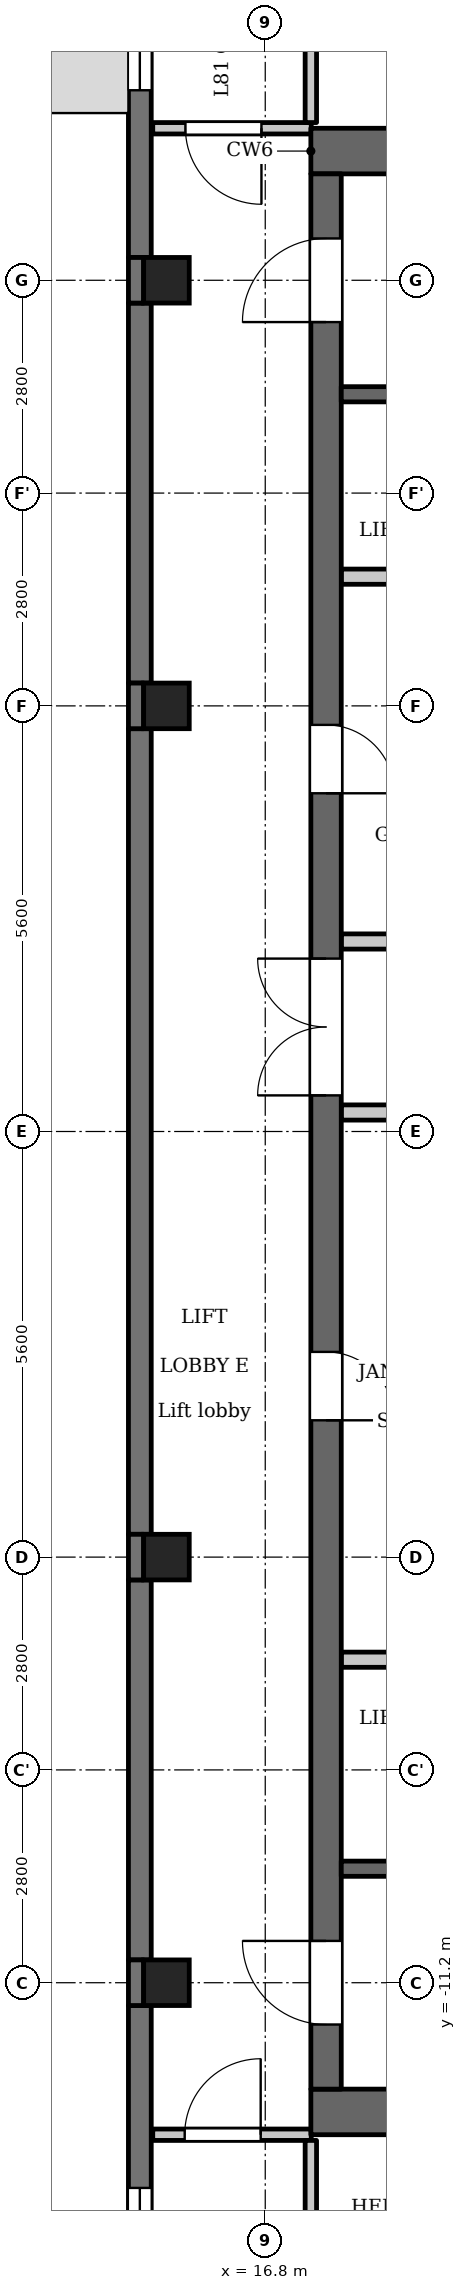
"""IFC4 building model, lengths in metres.
Left out: names, types, materials, properties, quantities, classifications, styles, units other than length and angle.
Written with IfcOpenShell. Run it as: python <this file> out.ifc"""

import sys

from ifc_helpers import new_model, si_unit, direction, frame, frame_2d, origin, origin_2d, place, context, subcontext, project, spatial, polyline, rectangle, outline, extrude, element, fill, save


model = new_model("IFC4")
c1 = context("Model", 3, precision=1e-05, world=origin(), true_north=direction((0.0, 1.0)))
c2 = subcontext(c1, "Body", "Model", "MODEL_VIEW")
j1 = project(units=[si_unit("LENGTHUNIT", "METRE"), si_unit("PLANEANGLEUNIT", "RADIAN")], contexts=[c1])
p1 = place(None, origin())
s1 = spatial("IfcSite", under=j1, at=p1, CompositionType="ELEMENT")
p2 = place(p1, origin())
s2 = spatial("IfcBuilding", under=s1, at=p2, CompositionType="ELEMENT")
p3 = place(p2, frame((0.0, 0.0, 313.9)))
s3 = spatial("IfcBuildingStorey", under=s2, at=p3, CompositionType="ELEMENT", Elevation=313.9)
for number, where, z_axis, x_axis in (
    (1, (15.5, -11.2, 0.0), (0.0, 0.0, 1.0), (1.0, 0.0, 0.0)),
    (2, (15.5, -5.6, 0.0), (0.0, 0.0, 1.0), (1.0, 0.0, 0.0)),
    (3, (15.5, 5.6, 0.0), (0.0, 0.0, 1.0), (1.0, 0.0, 0.0)),
    (4, (15.5, 11.2, 0.0), (0.0, 0.0, 1.0), (1.0, 0.0, 0.0)),
):
    element("IfcColumn", number, at=place(p3, frame(where, z_axis=z_axis, x_axis=x_axis)), inside=s3, PredefinedType="COLUMN", context=c2, shape_type="SweptSolid", body=[
        extrude(rectangle(XDim=0.6, YDim=0.6, at=origin_2d()), origin(), (0.0, 0.0, 1.0), 3.5),
    ])
p4 = place(p3, frame((15.15, 18.8, 0.0), z_axis=(0.0, 0.0, 1.0), x_axis=(0.0, -1.0, 0.0)))
e5 = element("IfcWall", 5, at=p4, inside=s3, PredefinedType="SOLIDWALL", context=c2, shape_type="SweptSolid", body=[
    extrude(rectangle(XDim=7.3, YDim=0.3, at=frame_2d((3.65, 0.0))), origin(), (0.0, 0.0, 1.0), 3.2),
])
p5 = place(p4, frame((0.462, 0.0, 0.9)))
e6 = element("IfcOpeningElement", 6, at=p5, cuts=e5, PredefinedType="OPENING", context=c2, shape_type="SweptSolid", body=[
    extrude(rectangle(XDim=1.8, YDim=1.25, at=frame_2d((0.9, 0.625))), frame((0.0, 0.16, 0.0), z_axis=(0.0, -1.0, 0.0), x_axis=(1.0, 0.0, 0.0)), (0.0, 0.0, 1.0), 0.32),
])
p6 = place(p4, frame((3.3, 0.0, 0.9)))
e7 = element("IfcOpeningElement", 7, at=p6, cuts=e5, PredefinedType="OPENING", context=c2, shape_type="SweptSolid", body=[
    extrude(rectangle(XDim=1.8, YDim=1.25, at=frame_2d((0.9, 0.625))), frame((0.0, 0.16, 0.0), z_axis=(0.0, -1.0, 0.0), x_axis=(1.0, 0.0, 0.0)), (0.0, 0.0, 1.0), 0.32),
])
p7 = place(p3, frame((15.15, 10.9, 0.0), z_axis=(0.0, 0.0, 1.0), x_axis=(0.0, -1.0, 0.0)))
e8 = element("IfcWall", 8, at=p7, inside=s3, PredefinedType="SOLIDWALL", context=c2, shape_type="SweptSolid", body=[
    extrude(rectangle(XDim=5.0, YDim=0.3, at=frame_2d((2.5, 0.0))), origin(), (0.0, 0.0, 1.0), 3.2),
])
p8 = place(p3, frame((15.15, 5.3, 0.0), z_axis=(0.0, 0.0, 1.0), x_axis=(0.0, -1.0, 0.0)))
e9 = element("IfcWall", 9, at=p8, inside=s3, PredefinedType="SOLIDWALL", context=c2, shape_type="SweptSolid", body=[
    extrude(rectangle(XDim=10.6, YDim=0.3, at=frame_2d((5.3, 0.0))), origin(), (0.0, 0.0, 1.0), 3.2),
])
p9 = place(p3, frame((15.15, -5.9, 0.0), z_axis=(0.0, 0.0, 1.0), x_axis=(0.0, -1.0, 0.0)))
e10 = element("IfcWall", 10, at=p9, inside=s3, PredefinedType="SOLIDWALL", context=c2, shape_type="SweptSolid", body=[
    extrude(rectangle(XDim=5.0, YDim=0.3, at=frame_2d((2.5, 0.0))), origin(), (0.0, 0.0, 1.0), 3.2),
])
p10 = place(p3, frame((15.15, -11.5, 0.0), z_axis=(0.0, 0.0, 1.0), x_axis=(0.0, -1.0, 0.0)))
e11 = element("IfcWall", 11, at=p10, inside=s3, PredefinedType="SOLIDWALL", context=c2, shape_type="SweptSolid", body=[
    extrude(rectangle(XDim=7.3, YDim=0.3, at=frame_2d((3.65, 0.0))), origin(), (0.0, 0.0, 1.0), 3.2),
])
p11 = place(p10, frame((2.4, 0.0, 0.9)))
e12 = element("IfcOpeningElement", 12, at=p11, cuts=e11, PredefinedType="OPENING", context=c2, shape_type="SweptSolid", body=[
    extrude(rectangle(XDim=2.6, YDim=1.25, at=frame_2d((1.3, 0.625))), frame((0.0, 0.16, 0.0), z_axis=(0.0, -1.0, 0.0), x_axis=(1.0, 0.0, 0.0)), (0.0, 0.0, 1.0), 0.32),
])
p12 = place(p10, frame((6.137, 0.0, 0.6)))
e13 = element("IfcOpeningElement", 13, at=p12, cuts=e11, PredefinedType="OPENING", context=c2, shape_type="SweptSolid", body=[
    extrude(rectangle(XDim=0.8, YDim=1.55, at=frame_2d((0.4, 0.775))), frame((0.0, 0.16, 0.0), z_axis=(0.0, -1.0, 0.0), x_axis=(1.0, 0.0, 0.0)), (0.0, 0.0, 1.0), 0.32),
])
p13 = place(p3, frame((0.0, 0.0, 3.5)))
e14 = element("IfcWall", 14, at=p13, inside=s3, PredefinedType="PARAPET", context=c2, shape_type="SweptSolid", body=[
    extrude(outline(polyline([(15.0, 19.6), (15.0, -19.6), (17.2, -19.6), (19.424, -19.176), (21.297, -17.903), (23.503, -15.697), (24.776, -13.824), (25.2, -11.6), (25.2, 11.6), (24.776, 13.824), (23.503, 15.697), (21.297, 17.903), (19.424, 19.176), (17.2, 19.6), (15.0, 19.6)]), holes=[polyline([(17.172, -19.3), (15.3, -19.3), (15.3, 19.3), (17.172, 19.3), (19.307, 18.893), (21.105, 17.671), (23.271, 15.505), (24.493, 13.707), (24.9, 11.572), (24.9, -11.572), (24.493, -13.707), (23.271, -15.505), (21.105, -17.671), (19.307, -18.893), (17.172, -19.3)])]), origin(), (0.0, 0.0, 1.0), 1.5),
])
for number, where, z_axis, x_axis in (
    (15, (17.4, 12.9, 0.0), (0.0, 0.0, 1.0), (1.0, 0.0, 0.0)),
    (16, (17.4, -12.9, 0.0), (0.0, 0.0, 1.0), (1.0, 0.0, 0.0)),
):
    element("IfcWall", number, at=place(p3, frame(where, z_axis=z_axis, x_axis=x_axis)), inside=s3, PredefinedType="SHEAR", context=c2, shape_type="SweptSolid", body=[
        extrude(rectangle(XDim=7.6, YDim=0.6, at=frame_2d((3.8, 0.0))), origin(), (0.0, 0.0, 1.0), 3.2),
    ])
p14 = place(p3, frame((17.6, -12.6, 0.0), z_axis=(0.0, 0.0, 1.0), x_axis=(0.0, 1.0, 0.0)))
e17 = element("IfcWall", 17, at=p14, inside=s3, PredefinedType="SHEAR", context=c2, shape_type="SweptSolid", body=[
    extrude(rectangle(XDim=25.2, YDim=0.4, at=frame_2d((12.6, 0.0))), origin(), (0.0, 0.0, 1.0), 3.2),
])
p15 = place(p14, frame((8.8, 0.0, 0.0)))
e18 = element("IfcOpeningElement", 18, at=p15, cuts=e17, PredefinedType="OPENING", context=c2, shape_type="SweptSolid", body=[
    extrude(rectangle(XDim=0.9, YDim=2.1, at=frame_2d((0.45, 1.05))), frame((0.0, 0.21, 0.0), z_axis=(0.0, -1.0, 0.0), x_axis=(1.0, 0.0, 0.0)), (0.0, 0.0, 1.0), 0.42),
])
p16 = place(p14, frame((17.05, 0.0, 0.0)))
e19 = element("IfcOpeningElement", 19, at=p16, cuts=e17, PredefinedType="OPENING", context=c2, shape_type="SweptSolid", body=[
    extrude(rectangle(XDim=0.9, YDim=2.1, at=frame_2d((0.45, 1.05))), frame((0.0, 0.21, 0.0), z_axis=(0.0, -1.0, 0.0), x_axis=(1.0, 0.0, 0.0)), (0.0, 0.0, 1.0), 0.42),
])
p17 = place(p14, frame((23.25, 0.0, 0.0)))
e20 = element("IfcOpeningElement", 20, at=p17, cuts=e17, PredefinedType="OPENING", context=c2, shape_type="SweptSolid", body=[
    extrude(rectangle(XDim=1.1, YDim=2.1, at=frame_2d((0.55, 1.05))), frame((0.0, 0.21, 0.0), z_axis=(0.0, -1.0, 0.0), x_axis=(1.0, 0.0, 0.0)), (0.0, 0.0, 1.0), 0.42),
])
p18 = place(p14, frame((0.85, 0.0, 0.0)))
e21 = element("IfcOpeningElement", 21, at=p18, cuts=e17, PredefinedType="OPENING", context=c2, shape_type="SweptSolid", body=[
    extrude(rectangle(XDim=1.1, YDim=2.1, at=frame_2d((0.55, 1.05))), frame((0.0, 0.21, 0.0), z_axis=(0.0, -1.0, 0.0), x_axis=(1.0, 0.0, 0.0)), (0.0, 0.0, 1.0), 0.42),
])
p19 = place(p14, frame((13.075, 0.0, 0.0)))
e22 = element("IfcOpeningElement", 22, at=p19, cuts=e17, PredefinedType="OPENING", context=c2, shape_type="SweptSolid", body=[
    extrude(rectangle(XDim=1.8, YDim=2.1, at=frame_2d((0.9, 1.05))), frame((0.0, 0.21, 0.0), z_axis=(0.0, -1.0, 0.0), x_axis=(1.0, 0.0, 0.0)), (0.0, 0.0, 1.0), 0.42),
])
p20 = place(p3, frame((17.8, -9.7, 0.0), z_axis=(0.0, 0.0, 1.0), x_axis=(1.0, 0.0, 0.0)))
e23 = element("IfcWall", 23, at=p20, inside=s3, PredefinedType="SHEAR", context=c2, shape_type="SweptSolid", body=[
    extrude(rectangle(XDim=5.8, YDim=0.2, at=frame_2d((2.9, 0.0))), origin(), (0.0, 0.0, 1.0), 3.2),
])
p21 = place(p20, frame((0.85, 0.0, 0.0)))
e24 = element("IfcOpeningElement", 24, at=p21, cuts=e23, PredefinedType="OPENING", context=c2, shape_type="SweptSolid", body=[
    extrude(rectangle(XDim=1.1, YDim=2.1, at=frame_2d((0.55, 1.05))), frame((0.0, 0.11, 0.0), z_axis=(0.0, -1.0, 0.0), x_axis=(1.0, 0.0, 0.0)), (0.0, 0.0, 1.0), 0.22),
])
p22 = place(p20, frame((3.75, 0.0, 0.0)))
e25 = element("IfcOpeningElement", 25, at=p22, cuts=e23, PredefinedType="OPENING", context=c2, shape_type="SweptSolid", body=[
    extrude(rectangle(XDim=1.1, YDim=2.1, at=frame_2d((0.55, 1.05))), frame((0.0, 0.11, 0.0), z_axis=(0.0, -1.0, 0.0), x_axis=(1.0, 0.0, 0.0)), (0.0, 0.0, 1.0), 0.22),
])
p23 = place(p3, frame((17.8, -6.95, 0.0), z_axis=(0.0, 0.0, 1.0), x_axis=(1.0, 0.0, 0.0)))
e26 = element("IfcWall", 26, at=p23, inside=s3, PredefinedType="PARTITIONING", context=c2, shape_type="SweptSolid", body=[
    extrude(rectangle(XDim=2.8, YDim=0.2, at=frame_2d((1.4, 0.0))), origin(), (0.0, 0.0, 1.0), 3.2),
])
p24 = place(p3, frame((17.8, 0.25, 0.0), z_axis=(0.0, 0.0, 1.0), x_axis=(1.0, 0.0, 0.0)))
e27 = element("IfcWall", 27, at=p24, inside=s3, PredefinedType="PARTITIONING", context=c2, shape_type="SweptSolid", body=[
    extrude(rectangle(XDim=3.0, YDim=0.2, at=frame_2d((1.5, 0.0))), origin(), (0.0, 0.0, 1.0), 3.2),
])
p25 = place(p24, frame((1.98, 0.0, 0.0)))
e28 = element("IfcOpeningElement", 28, at=p25, cuts=e27, PredefinedType="OPENING", context=c2, shape_type="SweptSolid", body=[
    extrude(rectangle(XDim=0.9, YDim=2.1, at=frame_2d((0.45, 1.05))), frame((0.0, 0.11, 0.0), z_axis=(0.0, -1.0, 0.0), x_axis=(1.0, 0.0, 0.0)), (0.0, 0.0, 1.0), 0.22),
])
p26 = place(p3, frame((17.8, 2.5, 0.0), z_axis=(0.0, 0.0, 1.0), x_axis=(1.0, 0.0, 0.0)))
e29 = element("IfcWall", 29, at=p26, inside=s3, PredefinedType="PARTITIONING", context=c2, shape_type="SweptSolid", body=[
    extrude(rectangle(XDim=3.0, YDim=0.2, at=frame_2d((1.5, 0.0))), origin(), (0.0, 0.0, 1.0), 3.2),
])
p27 = place(p3, frame((17.8, 7.3, 0.0), z_axis=(0.0, 0.0, 1.0), x_axis=(1.0, 0.0, 0.0)))
e30 = element("IfcWall", 30, at=p27, inside=s3, PredefinedType="PARTITIONING", context=c2, shape_type="SweptSolid", body=[
    extrude(rectangle(XDim=2.8, YDim=0.2, at=frame_2d((1.4, 0.0))), origin(), (0.0, 0.0, 1.0), 3.2),
])
p28 = place(p3, frame((17.8, 9.7, 0.0), z_axis=(0.0, 0.0, 1.0), x_axis=(1.0, 0.0, 0.0)))
e31 = element("IfcWall", 31, at=p28, inside=s3, PredefinedType="SHEAR", context=c2, shape_type="SweptSolid", body=[
    extrude(rectangle(XDim=5.8, YDim=0.2, at=frame_2d((2.9, 0.0))), origin(), (0.0, 0.0, 1.0), 3.2),
])
p29 = place(p28, frame((0.85, 0.0, 0.0)))
e32 = element("IfcOpeningElement", 32, at=p29, cuts=e31, PredefinedType="OPENING", context=c2, shape_type="SweptSolid", body=[
    extrude(rectangle(XDim=1.1, YDim=2.1, at=frame_2d((0.55, 1.05))), frame((0.0, 0.11, 0.0), z_axis=(0.0, -1.0, 0.0), x_axis=(1.0, 0.0, 0.0)), (0.0, 0.0, 1.0), 0.22),
])
p30 = place(p28, frame((3.75, 0.0, 0.0)))
e33 = element("IfcOpeningElement", 33, at=p30, cuts=e31, PredefinedType="OPENING", context=c2, shape_type="SweptSolid", body=[
    extrude(rectangle(XDim=1.1, YDim=2.1, at=frame_2d((0.55, 1.05))), frame((0.0, 0.11, 0.0), z_axis=(0.0, -1.0, 0.0), x_axis=(1.0, 0.0, 0.0)), (0.0, 0.0, 1.0), 0.22),
])
p31 = place(p3, frame((15.32, -13.2, 0.0), z_axis=(0.0, 0.0, 1.0), x_axis=(1.0, 0.0, 0.0)))
e34 = element("IfcWall", 34, at=p31, inside=s3, PredefinedType="PARTITIONING", context=c2, shape_type="SweptSolid", body=[
    extrude(rectangle(XDim=2.085, YDim=0.15, at=frame_2d((1.042, 0.0))), origin(), (0.0, 0.0, 1.0), 3.2),
])
p32 = place(p31, frame((0.42, 0.0, 0.0)))
e35 = element("IfcOpeningElement", 35, at=p32, cuts=e34, PredefinedType="OPENING", context=c2, shape_type="SweptSolid", body=[
    extrude(rectangle(XDim=1.0, YDim=2.1, at=frame_2d((0.5, 1.05))), frame((0.0, 0.085, 0.0), z_axis=(0.0, -1.0, 0.0), x_axis=(1.0, 0.0, 0.0)), (0.0, 0.0, 1.0), 0.17),
])
p33 = place(p3, frame((15.32, 13.2, 0.0), z_axis=(0.0, 0.0, 1.0), x_axis=(1.0, 0.0, 0.0)))
e36 = element("IfcWall", 36, at=p33, inside=s3, PredefinedType="PARTITIONING", context=c2, shape_type="SweptSolid", body=[
    extrude(rectangle(XDim=2.085, YDim=0.15, at=frame_2d((1.042, 0.0))), origin(), (0.0, 0.0, 1.0), 3.2),
])
p34 = place(p33, frame((0.43, 0.0, 0.0)))
e37 = element("IfcOpeningElement", 37, at=p34, cuts=e36, PredefinedType="OPENING", context=c2, shape_type="SweptSolid", body=[
    extrude(rectangle(XDim=1.0, YDim=2.1, at=frame_2d((0.5, 1.05))), frame((0.0, 0.085, 0.0), z_axis=(0.0, -1.0, 0.0), x_axis=(1.0, 0.0, 0.0)), (0.0, 0.0, 1.0), 0.17),
])
p35 = place(p3, frame((17.4, -17.125, 0.0), z_axis=(0.0, 0.0, 1.0), x_axis=(0.0, 1.0, 0.0)))
e38 = element("IfcWall", 38, at=p35, inside=s3, PredefinedType="PARTITIONING", context=c2, shape_type="SweptSolid", body=[
    extrude(rectangle(XDim=3.85, YDim=0.15, at=frame_2d((1.925, 0.0))), origin(), (0.0, 0.0, 1.0), 3.2),
])
p36 = place(p35, frame((0.575, 0.0, 0.0)))
e39 = element("IfcOpeningElement", 39, at=p36, cuts=e38, PredefinedType="OPENING", context=c2, shape_type="SweptSolid", body=[
    extrude(rectangle(XDim=0.9, YDim=2.1, at=frame_2d((0.45, 1.05))), frame((0.0, 0.085, 0.0), z_axis=(0.0, -1.0, 0.0), x_axis=(1.0, 0.0, 0.0)), (0.0, 0.0, 1.0), 0.17),
])
p37 = place(p3, frame((17.4, 13.275, 0.0), z_axis=(0.0, 0.0, 1.0), x_axis=(0.0, 1.0, 0.0)))
e40 = element("IfcWall", 40, at=p37, inside=s3, PredefinedType="PARTITIONING", context=c2, shape_type="SweptSolid", body=[
    extrude(rectangle(XDim=2.65, YDim=0.15, at=frame_2d((1.325, 0.0))), origin(), (0.0, 0.0, 1.0), 3.2),
])
p38 = place(p37, frame((1.075, 0.0, 0.0)))
e41 = element("IfcOpeningElement", 41, at=p38, cuts=e40, PredefinedType="OPENING", context=c2, shape_type="SweptSolid", body=[
    extrude(rectangle(XDim=1.0, YDim=2.1, at=frame_2d((0.5, 1.05))), frame((0.0, 0.085, 0.0), z_axis=(0.0, -1.0, 0.0), x_axis=(1.0, 0.0, 0.0)), (0.0, 0.0, 1.0), 0.17),
])
p39 = place(p3, origin())
e42 = element("IfcWall", 42, at=p39, inside=s3, PredefinedType="SOLIDWALL", context=c2, shape_type="SweptSolid", body=[
    extrude(outline(polyline([(15.2, -10.9), (15.0, -10.9), (15.0, -11.5), (15.2, -11.5), (15.2, -10.9)])), origin(), (0.0, 0.0, 1.0), 3.2),
])
e43 = element("IfcWall", 43, at=p39, inside=s3, PredefinedType="SOLIDWALL", context=c2, shape_type="SweptSolid", body=[
    extrude(outline(polyline([(15.2, -5.3), (15.0, -5.3), (15.0, -5.9), (15.3, -5.9), (15.2, -5.9), (15.2, -5.3)])), origin(), (0.0, 0.0, 1.0), 3.2),
])
e44 = element("IfcWall", 44, at=p39, inside=s3, PredefinedType="SOLIDWALL", context=c2, shape_type="SweptSolid", body=[
    extrude(outline(polyline([(15.3, 5.9), (15.0, 5.9), (15.0, 5.3), (15.3, 5.3), (15.2, 5.3), (15.2, 5.9), (15.3, 5.9)])), origin(), (0.0, 0.0, 1.0), 3.2),
])
e45 = element("IfcWall", 45, at=p39, inside=s3, PredefinedType="SOLIDWALL", context=c2, shape_type="SweptSolid", body=[
    extrude(outline(polyline([(15.2, 11.5), (15.0, 11.5), (15.0, 10.9), (15.2, 10.9), (15.2, 11.5)])), origin(), (0.0, 0.0, 1.0), 3.2),
])
p40 = place(p15, origin())
e46 = element("IfcDoor", 46, at=p40, inside=s3, OperationType="SINGLE_SWING_LEFT", PredefinedType="DOOR", context=c2, shape_type="SweptSolid", body=[
    extrude(rectangle(XDim=0.9, YDim=2.1, at=frame_2d((0.45, 1.05))), frame((0.0, 0.025, 0.0), z_axis=(0.0, -1.0, 0.0), x_axis=(1.0, 0.0, 0.0)), (0.0, 0.0, 1.0), 0.05),
])
fill(e18, e46)
p41 = place(p16, origin())
e47 = element("IfcDoor", 47, at=p41, inside=s3, OperationType="SINGLE_SWING_LEFT", PredefinedType="DOOR", context=c2, shape_type="SweptSolid", body=[
    extrude(rectangle(XDim=0.9, YDim=2.1, at=frame_2d((0.45, 1.05))), frame((0.0, 0.025, 0.0), z_axis=(0.0, -1.0, 0.0), x_axis=(1.0, 0.0, 0.0)), (0.0, 0.0, 1.0), 0.05),
])
fill(e19, e47)
p42 = place(p17, origin())
e48 = element("IfcDoor", 48, at=p42, inside=s3, OperationType="SINGLE_SWING_RIGHT", PredefinedType="DOOR", context=c2, shape_type="SweptSolid", body=[
    extrude(rectangle(XDim=1.1, YDim=2.1, at=frame_2d((0.55, 1.05))), frame((0.0, 0.025, 0.0), z_axis=(0.0, -1.0, 0.0), x_axis=(1.0, 0.0, 0.0)), (0.0, 0.0, 1.0), 0.05),
])
fill(e20, e48)
p43 = place(p18, origin())
e49 = element("IfcDoor", 49, at=p43, inside=s3, OperationType="SINGLE_SWING_LEFT", PredefinedType="DOOR", context=c2, shape_type="SweptSolid", body=[
    extrude(rectangle(XDim=1.1, YDim=2.1, at=frame_2d((0.55, 1.05))), frame((0.0, 0.025, 0.0), z_axis=(0.0, -1.0, 0.0), x_axis=(1.0, 0.0, 0.0)), (0.0, 0.0, 1.0), 0.05),
])
fill(e21, e49)
p44 = place(p19, origin())
e50 = element("IfcDoor", 50, at=p44, inside=s3, OperationType="DOUBLE_DOOR_SINGLE_SWING", PredefinedType="DOOR", context=c2, shape_type="SweptSolid", body=[
    extrude(rectangle(XDim=1.8, YDim=2.1, at=frame_2d((0.9, 1.05))), frame((0.0, 0.025, 0.0), z_axis=(0.0, -1.0, 0.0), x_axis=(1.0, 0.0, 0.0)), (0.0, 0.0, 1.0), 0.05),
])
fill(e22, e50)
p45 = place(p34, origin())
e51 = element("IfcDoor", 51, at=p45, inside=s3, OperationType="SINGLE_SWING_RIGHT", PredefinedType="DOOR", context=c2, shape_type="SweptSolid", body=[
    extrude(rectangle(XDim=1.0, YDim=2.1, at=frame_2d((0.5, 1.05))), frame((0.0, 0.025, 0.0), z_axis=(0.0, -1.0, 0.0), x_axis=(1.0, 0.0, 0.0)), (0.0, 0.0, 1.0), 0.05),
])
fill(e37, e51)
p46 = place(p32, origin())
e52 = element("IfcDoor", 52, at=p46, inside=s3, OperationType="SINGLE_SWING_LEFT", PredefinedType="DOOR", context=c2, shape_type="SweptSolid", body=[
    extrude(rectangle(XDim=1.0, YDim=2.1, at=frame_2d((0.5, 1.05))), frame((0.0, 0.025, 0.0), z_axis=(0.0, -1.0, 0.0), x_axis=(1.0, 0.0, 0.0)), (0.0, 0.0, 1.0), 0.05),
])
fill(e35, e52)
p47 = place(p6, origin())
e53 = element("IfcWindow", 53, at=p47, inside=s3, PartitioningType="SINGLE_PANEL", PredefinedType="WINDOW", context=c2, shape_type="SweptSolid", body=[
    extrude(rectangle(XDim=1.8, YDim=1.25, at=frame_2d((0.9, 0.625))), frame((0.0, 0.03, 0.0), z_axis=(0.0, -1.0, 0.0), x_axis=(1.0, 0.0, 0.0)), (0.0, 0.0, 1.0), 0.06),
])
fill(e7, e53)
p48 = place(p11, origin())
e54 = element("IfcWindow", 54, at=p48, inside=s3, PartitioningType="SINGLE_PANEL", PredefinedType="WINDOW", context=c2, shape_type="SweptSolid", body=[
    extrude(rectangle(XDim=2.6, YDim=1.25, at=frame_2d((1.3, 0.625))), frame((0.0, 0.03, 0.0), z_axis=(0.0, -1.0, 0.0), x_axis=(1.0, 0.0, 0.0)), (0.0, 0.0, 1.0), 0.06),
])
fill(e12, e54)
save(model, sys.argv[1])
